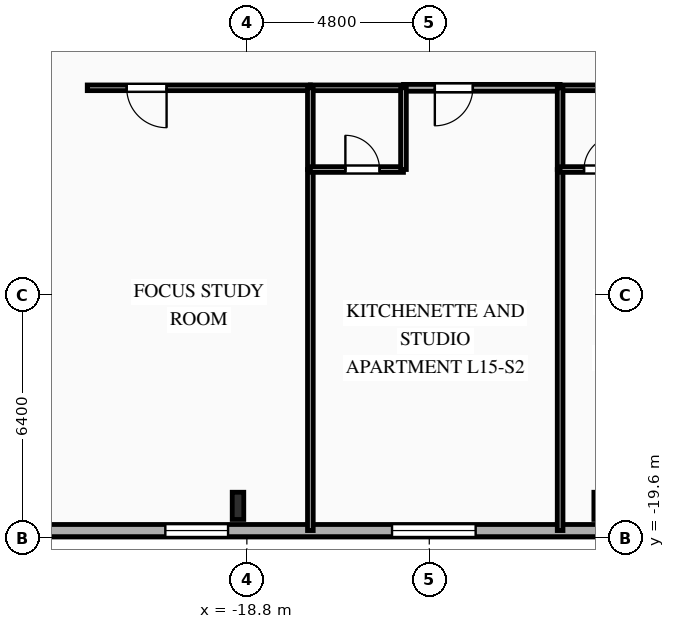
"""IFC4 building model, lengths in metres.
Left out: names, types, materials, properties, quantities, classifications, styles, units other than length and angle.
Written with IfcOpenShell. Run it as: python <this file> out.ifc"""

import sys

from ifc_helpers import new_model, si_unit, direction, frame, frame_2d, origin, origin_2d, place, context, subcontext, project, spatial, rectangle, i_section, extrude, element, fill, save


model = new_model("IFC4")
c1 = context("Model", 3, precision=1e-05, world=origin(), true_north=direction((0.0, 1.0)))
c2 = subcontext(c1, "Body", "Model", "MODEL_VIEW")
j1 = project(units=[si_unit("LENGTHUNIT", "METRE"), si_unit("PLANEANGLEUNIT", "RADIAN")], contexts=[c1])
p1 = place(None, origin())
s1 = spatial("IfcSite", under=j1, at=p1, CompositionType="ELEMENT")
p2 = place(p1, origin())
s2 = spatial("IfcBuilding", under=s1, at=p2, CompositionType="ELEMENT")
p3 = place(p2, frame((0.0, 0.0, 57.15)))
s3 = spatial("IfcBuildingStorey", under=s2, at=p3, CompositionType="ELEMENT", Elevation=57.15)
for number, where, z_axis, x_axis in (
    (1, (-19.033, -18.75, 0.0), (0.0, 0.0, 1.0), (1.0, 0.0, 0.0)),
    (2, (-9.517, -18.75, 0.0), (0.0, 0.0, 1.0), (1.0, 0.0, 0.0)),
):
    element("IfcColumn", number, at=place(p3, frame(where, z_axis=z_axis, x_axis=x_axis)), inside=s3, PredefinedType="COLUMN", context=c2, shape_type="SweptSolid", body=[
        extrude(i_section(OverallWidth=0.304, OverallDepth=0.716, WebThickness=0.021, FlangeThickness=0.04, FilletRadius=0.027, at=origin_2d()), origin(), (0.0, 0.0, 1.0), 3.35),
    ])
p4 = place(p3, frame((29.2, -19.4, 0.0), z_axis=(0.0, 0.0, 1.0), x_axis=(-1.0, 0.0, 0.0)))
e3 = element("IfcWall", 3, at=p4, inside=s3, PredefinedType="SOLIDWALL", context=c2, shape_type="SweptSolid", body=[
    extrude(rectangle(XDim=58.4, YDim=0.32, at=frame_2d((29.2, 0.0))), origin(), (0.0, 0.0, 1.0), 3.035),
])
p5 = place(p4, frame((7.215, 0.0, 0.85)))
e4 = element("IfcOpeningElement", 4, at=p5, cuts=e3, PredefinedType="OPENING", context=c2, shape_type="SweptSolid", body=[
    extrude(rectangle(XDim=1.65, YDim=1.85, at=frame_2d((0.825, 0.925))), frame((0.0, 0.17, 0.0), z_axis=(0.0, -1.0, 0.0), x_axis=(1.0, 0.0, 0.0)), (0.0, 0.0, 1.0), 0.34),
])
p6 = place(p4, frame((10.855, 0.0, 0.85)))
e5 = element("IfcOpeningElement", 5, at=p6, cuts=e3, PredefinedType="OPENING", context=c2, shape_type="SweptSolid", body=[
    extrude(rectangle(XDim=1.65, YDim=1.85, at=frame_2d((0.825, 0.925))), frame((0.0, 0.17, 0.0), z_axis=(0.0, -1.0, 0.0), x_axis=(1.0, 0.0, 0.0)), (0.0, 0.0, 1.0), 0.34),
])
p7 = place(p4, frame((15.7, 0.0, 0.85)))
e6 = element("IfcOpeningElement", 6, at=p7, cuts=e3, PredefinedType="OPENING", context=c2, shape_type="SweptSolid", body=[
    extrude(rectangle(XDim=2.2, YDim=1.85, at=frame_2d((1.1, 0.925))), frame((0.0, 0.17, 0.0), z_axis=(0.0, -1.0, 0.0), x_axis=(1.0, 0.0, 0.0)), (0.0, 0.0, 1.0), 0.34),
])
p8 = place(p4, frame((22.26, 0.0, 0.85)))
e7 = element("IfcOpeningElement", 7, at=p8, cuts=e3, PredefinedType="OPENING", context=c2, shape_type="SweptSolid", body=[
    extrude(rectangle(XDim=2.2, YDim=1.85, at=frame_2d((1.1, 0.925))), frame((0.0, 0.17, 0.0), z_axis=(0.0, -1.0, 0.0), x_axis=(1.0, 0.0, 0.0)), (0.0, 0.0, 1.0), 0.34),
])
p9 = place(p4, frame((29.408, 0.0, 0.85)))
e8 = element("IfcOpeningElement", 8, at=p9, cuts=e3, PredefinedType="OPENING", context=c2, shape_type="SweptSolid", body=[
    extrude(rectangle(XDim=2.2, YDim=1.85, at=frame_2d((1.1, 0.925))), frame((0.0, 0.17, 0.0), z_axis=(0.0, -1.0, 0.0), x_axis=(1.0, 0.0, 0.0)), (0.0, 0.0, 1.0), 0.34),
])
p10 = place(p4, frame((35.38, 0.0, 0.85)))
e9 = element("IfcOpeningElement", 9, at=p10, cuts=e3, PredefinedType="OPENING", context=c2, shape_type="SweptSolid", body=[
    extrude(rectangle(XDim=2.2, YDim=1.85, at=frame_2d((1.1, 0.925))), frame((0.0, 0.17, 0.0), z_axis=(0.0, -1.0, 0.0), x_axis=(1.0, 0.0, 0.0)), (0.0, 0.0, 1.0), 0.34),
])
p11 = place(p4, frame((41.98, 0.0, 0.85)))
e10 = element("IfcOpeningElement", 10, at=p11, cuts=e3, PredefinedType="OPENING", context=c2, shape_type="SweptSolid", body=[
    extrude(rectangle(XDim=2.2, YDim=1.85, at=frame_2d((1.1, 0.925))), frame((0.0, 0.17, 0.0), z_axis=(0.0, -1.0, 0.0), x_axis=(1.0, 0.0, 0.0)), (0.0, 0.0, 1.0), 0.34),
])
p12 = place(p4, frame((48.495, 0.0, 0.85)))
e11 = element("IfcOpeningElement", 11, at=p12, cuts=e3, PredefinedType="OPENING", context=c2, shape_type="SweptSolid", body=[
    extrude(rectangle(XDim=1.65, YDim=1.85, at=frame_2d((0.825, 0.925))), frame((0.0, 0.17, 0.0), z_axis=(0.0, -1.0, 0.0), x_axis=(1.0, 0.0, 0.0)), (0.0, 0.0, 1.0), 0.34),
])
p13 = place(p3, frame((-17.129, -7.75, 0.0), z_axis=(0.0, 0.0, 1.0), x_axis=(-1.0, 0.0, 0.0)))
e12 = element("IfcWall", 12, at=p13, inside=s3, PredefinedType="PARTITIONING", context=c2, shape_type="SweptSolid", body=[
    extrude(rectangle(XDim=5.871, YDim=0.15, at=frame_2d((2.936, 0.0))), origin(), (0.0, 0.0, 1.0), 3.035),
])
p14 = place(p13, frame((3.783, 0.0, 0.0)))
e13 = element("IfcOpeningElement", 13, at=p14, cuts=e12, PredefinedType="OPENING", context=c2, shape_type="SweptSolid", body=[
    extrude(rectangle(XDim=1.05, YDim=2.15, at=frame_2d((0.525, 1.075))), frame((0.0, 0.085, 0.0), z_axis=(0.0, -1.0, 0.0), x_axis=(1.0, 0.0, 0.0)), (0.0, 0.0, 1.0), 0.17),
])
p15 = place(p3, frame((-10.557, -7.75, 0.0), z_axis=(0.0, 0.0, 1.0), x_axis=(-1.0, 0.0, 0.0)))
e14 = element("IfcWall", 14, at=p15, inside=s3, PredefinedType="PARTITIONING", context=c2, shape_type="SweptSolid", body=[
    extrude(rectangle(XDim=4.122, YDim=0.18, at=frame_2d((2.061, 0.0))), origin(), (0.0, 0.0, 1.0), 3.035),
])
p16 = place(p15, frame((2.297, 0.0, 0.0)))
e15 = element("IfcOpeningElement", 15, at=p16, cuts=e14, PredefinedType="OPENING", context=c2, shape_type="SweptSolid", body=[
    extrude(rectangle(XDim=1.0, YDim=2.15, at=frame_2d((0.5, 1.075))), frame((0.0, 0.1, 0.0), z_axis=(0.0, -1.0, 0.0), x_axis=(1.0, 0.0, 0.0)), (0.0, 0.0, 1.0), 0.2),
])
for number, where, z_axis, x_axis in (
    (16, (-14.679, -7.75, 0.0), (0.0, 0.0, 1.0), (-1.0, 0.0, 0.0)),
    (17, (-8.107, -7.75, 0.0), (0.0, 0.0, 1.0), (-1.0, 0.0, 0.0)),
):
    element("IfcWall", number, at=place(p3, frame(where, z_axis=z_axis, x_axis=x_axis)), inside=s3, PredefinedType="PLUMBINGWALL", context=c2, shape_type="SweptSolid", body=[
        extrude(rectangle(XDim=2.45, YDim=0.15, at=frame_2d((1.225, 0.0))), origin(), (0.0, 0.0, 1.0), 3.035),
    ])
p17 = place(p3, frame((-17.129, -9.9, 0.0), z_axis=(0.0, 0.0, 1.0), x_axis=(0.0, -1.0, 0.0)))
e18 = element("IfcWall", 18, at=p17, inside=s3, PredefinedType="PARTITIONING", context=c2, shape_type="SweptSolid", body=[
    extrude(rectangle(XDim=9.5, YDim=0.15, at=frame_2d((4.75, 0.0))), origin(), (0.0, 0.0, 1.0), 3.035),
])
p18 = place(p3, frame((-17.129, -7.75, 0.0), z_axis=(0.0, 0.0, 1.0), x_axis=(0.0, -1.0, 0.0)))
e19 = element("IfcWall", 19, at=p18, inside=s3, PredefinedType="PLUMBINGWALL", context=c2, shape_type="SweptSolid", body=[
    extrude(rectangle(XDim=2.15, YDim=0.15, at=frame_2d((1.075, 0.0))), origin(), (0.0, 0.0, 1.0), 3.035),
])
p19 = place(p3, frame((-17.129, -9.9, 0.0), z_axis=(0.0, 0.0, 1.0), x_axis=(1.0, 0.0, 0.0)))
e20 = element("IfcWall", 20, at=p19, inside=s3, PredefinedType="PLUMBINGWALL", context=c2, shape_type="SweptSolid", body=[
    extrude(rectangle(XDim=2.45, YDim=0.15, at=frame_2d((1.225, 0.0))), origin(), (0.0, 0.0, 1.0), 3.035),
])
p20 = place(p19, frame((0.921, 0.0, 0.0)))
e21 = element("IfcOpeningElement", 21, at=p20, cuts=e20, PredefinedType="OPENING", context=c2, shape_type="SweptSolid", body=[
    extrude(rectangle(XDim=0.9, YDim=2.1, at=frame_2d((0.45, 1.05))), frame((0.0, 0.085, 0.0), z_axis=(0.0, -1.0, 0.0), x_axis=(1.0, 0.0, 0.0)), (0.0, 0.0, 1.0), 0.17),
])
p21 = place(p3, frame((-14.679, -9.9, 0.0), z_axis=(0.0, 0.0, 1.0), x_axis=(0.0, 1.0, 0.0)))
e22 = element("IfcWall", 22, at=p21, inside=s3, PredefinedType="PLUMBINGWALL", context=c2, shape_type="SweptSolid", body=[
    extrude(rectangle(XDim=2.15, YDim=0.15, at=frame_2d((1.075, 0.0))), origin(), (0.0, 0.0, 1.0), 3.035),
])
p22 = place(p3, frame((-10.557, -9.9, 0.0), z_axis=(0.0, 0.0, 1.0), x_axis=(0.0, -1.0, 0.0)))
e23 = element("IfcWall", 23, at=p22, inside=s3, PredefinedType="PARTITIONING", context=c2, shape_type="SweptSolid", body=[
    extrude(rectangle(XDim=9.5, YDim=0.15, at=frame_2d((4.75, 0.0))), origin(), (0.0, 0.0, 1.0), 3.035),
])
p23 = place(p3, frame((-10.557, -7.75, 0.0), z_axis=(0.0, 0.0, 1.0), x_axis=(0.0, -1.0, 0.0)))
e24 = element("IfcWall", 24, at=p23, inside=s3, PredefinedType="PLUMBINGWALL", context=c2, shape_type="SweptSolid", body=[
    extrude(rectangle(XDim=2.15, YDim=0.15, at=frame_2d((1.075, 0.0))), origin(), (0.0, 0.0, 1.0), 3.035),
])
p24 = place(p3, frame((-10.557, -9.9, 0.0), z_axis=(0.0, 0.0, 1.0), x_axis=(1.0, 0.0, 0.0)))
e25 = element("IfcWall", 25, at=p24, inside=s3, PredefinedType="PLUMBINGWALL", context=c2, shape_type="SweptSolid", body=[
    extrude(rectangle(XDim=2.45, YDim=0.15, at=frame_2d((1.225, 0.0))), origin(), (0.0, 0.0, 1.0), 3.035),
])
p25 = place(p24, frame((0.629, 0.0, 0.0)))
e26 = element("IfcOpeningElement", 26, at=p25, cuts=e25, PredefinedType="OPENING", context=c2, shape_type="SweptSolid", body=[
    extrude(rectangle(XDim=0.9, YDim=2.1, at=frame_2d((0.45, 1.05))), frame((0.0, 0.085, 0.0), z_axis=(0.0, -1.0, 0.0), x_axis=(1.0, 0.0, 0.0)), (0.0, 0.0, 1.0), 0.17),
])
p26 = place(p11, origin())
e27 = element("IfcWindow", 27, at=p26, inside=s3, PartitioningType="SINGLE_PANEL", PredefinedType="WINDOW", context=c2, shape_type="SweptSolid", body=[
    extrude(rectangle(XDim=2.2, YDim=1.85, at=frame_2d((1.1, 0.925))), frame((0.0, 0.03, 0.0), z_axis=(0.0, -1.0, 0.0), x_axis=(1.0, 0.0, 0.0)), (0.0, 0.0, 1.0), 0.06),
])
fill(e10, e27)
p27 = place(p12, origin())
e28 = element("IfcWindow", 28, at=p27, inside=s3, PartitioningType="SINGLE_PANEL", PredefinedType="WINDOW", context=c2, shape_type="SweptSolid", body=[
    extrude(rectangle(XDim=1.65, YDim=1.85, at=frame_2d((0.825, 0.925))), frame((0.0, 0.03, 0.0), z_axis=(0.0, -1.0, 0.0), x_axis=(1.0, 0.0, 0.0)), (0.0, 0.0, 1.0), 0.06),
])
fill(e11, e28)
p28 = place(p14, origin())
e29 = element("IfcDoor", 29, at=p28, inside=s3, OperationType="SINGLE_SWING_LEFT", PredefinedType="DOOR", context=c2, shape_type="SweptSolid", body=[
    extrude(rectangle(XDim=1.05, YDim=2.15, at=frame_2d((0.525, 1.075))), frame((0.0, 0.025, 0.0), z_axis=(0.0, -1.0, 0.0), x_axis=(1.0, 0.0, 0.0)), (0.0, 0.0, 1.0), 0.05),
])
fill(e13, e29)
p29 = place(p16, origin())
e30 = element("IfcDoor", 30, at=p29, inside=s3, OperationType="SINGLE_SWING_RIGHT", PredefinedType="DOOR", context=c2, shape_type="SweptSolid", body=[
    extrude(rectangle(XDim=1.0, YDim=2.15, at=frame_2d((0.5, 1.075))), frame((0.0, 0.025, 0.0), z_axis=(0.0, -1.0, 0.0), x_axis=(1.0, 0.0, 0.0)), (0.0, 0.0, 1.0), 0.05),
])
fill(e15, e30)
p30 = place(p20, origin())
e31 = element("IfcDoor", 31, at=p30, inside=s3, OperationType="SINGLE_SWING_LEFT", PredefinedType="DOOR", context=c2, shape_type="SweptSolid", body=[
    extrude(rectangle(XDim=0.9, YDim=2.1, at=frame_2d((0.45, 1.05))), frame((0.0, 0.025, 0.0), z_axis=(0.0, -1.0, 0.0), x_axis=(1.0, 0.0, 0.0)), (0.0, 0.0, 1.0), 0.05),
])
fill(e21, e31)
p31 = place(p25, origin())
e32 = element("IfcDoor", 32, at=p31, inside=s3, OperationType="SINGLE_SWING_RIGHT", PredefinedType="DOOR", context=c2, shape_type="SweptSolid", body=[
    extrude(rectangle(XDim=0.9, YDim=2.1, at=frame_2d((0.45, 1.05))), frame((0.0, 0.025, 0.0), z_axis=(0.0, -1.0, 0.0), x_axis=(1.0, 0.0, 0.0)), (0.0, 0.0, 1.0), 0.05),
])
fill(e26, e32)
save(model, sys.argv[1])
